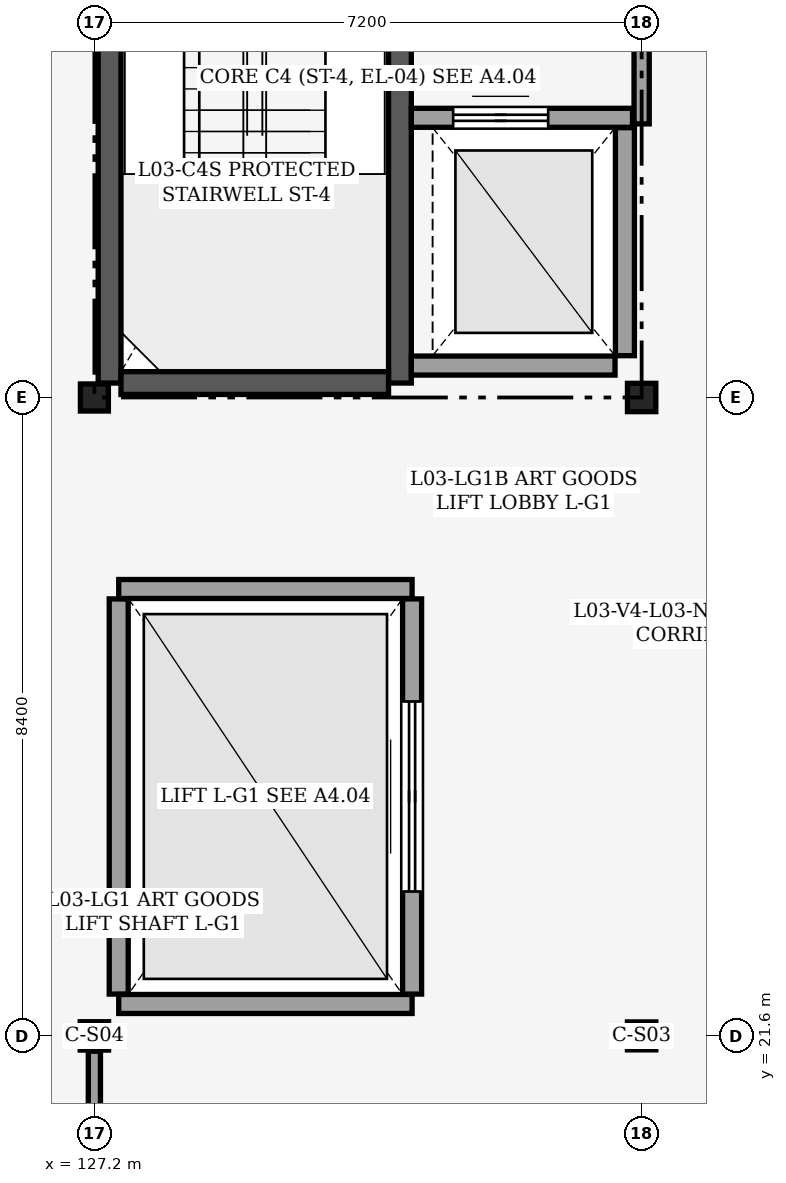
"""IFC4 building model, lengths in metres.
Left out: names, types, materials, properties, quantities, classifications, styles, units other than length and angle.
Written with IfcOpenShell. Run it as: python <this file> out.ifc"""

import sys

from ifc_helpers import new_model, si_unit, direction, frame, frame_2d, origin, origin_2d, place, context, subcontext, project, spatial, rectangle, i_section, extrude, element, fill, save


model = new_model("IFC4")
c1 = context("Model", 3, precision=1e-05, world=origin(), true_north=direction((0.0, 1.0)))
c2 = subcontext(c1, "Body", "Model", "MODEL_VIEW")
j1 = project(units=[si_unit("LENGTHUNIT", "METRE"), si_unit("PLANEANGLEUNIT", "RADIAN")], contexts=[c1])
p1 = place(None, origin())
s1 = spatial("IfcSite", under=j1, at=p1, CompositionType="ELEMENT")
p2 = place(p1, origin())
s2 = spatial("IfcBuilding", under=s1, at=p2, CompositionType="ELEMENT")
p3 = place(p2, frame((0.0, 0.0, 15.0)))
s3 = spatial("IfcBuildingStorey", under=s2, at=p3, CompositionType="ELEMENT", Elevation=15.0)
p4 = place(p3, frame((127.2, 21.6, 0.0), z_axis=(0.0, 0.0, 1.0), x_axis=(1.0, 0.0, 0.0)))
e1 = element("IfcColumn", 1, at=p4, inside=s3, PredefinedType="COLUMN", context=c2, shape_type="SweptSolid", body=[
    extrude(i_section(OverallWidth=0.373, OverallDepth=0.373, WebThickness=0.016, FlangeThickness=0.026, FilletRadius=0.025, at=origin_2d()), origin(), (0.0, 0.0, 1.0), 4.8),
])
p5 = place(p3, frame((127.2, 30.0, 0.0), z_axis=(0.0, 0.0, 1.0), x_axis=(1.0, 0.0, 0.0)))
e2 = element("IfcColumn", 2, at=p5, inside=s3, PredefinedType="COLUMN", context=c2, shape_type="SweptSolid", body=[
    extrude(i_section(OverallWidth=0.368, OverallDepth=0.356, WebThickness=0.011, FlangeThickness=0.018, FilletRadius=0.025, at=origin_2d()), origin(), (0.0, 0.0, 1.0), 4.8),
])
p6 = place(p3, frame((134.4, 21.6, 0.0), z_axis=(0.0, 0.0, 1.0), x_axis=(1.0, 0.0, 0.0)))
e3 = element("IfcColumn", 3, at=p6, inside=s3, PredefinedType="COLUMN", context=c2, shape_type="SweptSolid", body=[
    extrude(i_section(OverallWidth=0.373, OverallDepth=0.368, WebThickness=0.015, FlangeThickness=0.024, FilletRadius=0.025, at=origin_2d()), origin(), (0.0, 0.0, 1.0), 4.8),
])
p7 = place(p3, frame((134.4, 30.0, 0.0), z_axis=(0.0, 0.0, 1.0), x_axis=(1.0, 0.0, 0.0)))
e4 = element("IfcColumn", 4, at=p7, inside=s3, PredefinedType="COLUMN", context=c2, shape_type="SweptSolid", body=[
    extrude(i_section(OverallWidth=0.373, OverallDepth=0.373, WebThickness=0.016, FlangeThickness=0.026, FilletRadius=0.025, at=origin_2d()), origin(), (0.0, 0.0, 1.0), 4.8),
])
p8 = place(p3, frame((127.4, 30.19, 0.0), z_axis=(0.0, 0.0, 1.0), x_axis=(0.0, 1.0, 0.0)))
e5 = element("IfcWall", 5, at=p8, inside=s3, PredefinedType="SHEAR", context=c2, shape_type="SweptSolid", body=[
    extrude(rectangle(XDim=8.02, YDim=0.3, at=frame_2d((4.01, 0.0))), origin(), (0.0, 0.0, 1.0), 4.54),
])
p9 = place(p3, frame((131.22, 30.19, 0.0), z_axis=(0.0, 0.0, 1.0), x_axis=(0.0, 1.0, 0.0)))
e6 = element("IfcWall", 6, at=p9, inside=s3, PredefinedType="SHEAR", context=c2, shape_type="SweptSolid", body=[
    extrude(rectangle(XDim=8.02, YDim=0.3, at=frame_2d((4.01, 0.0))), origin(), (0.0, 0.0, 1.0), 4.54),
])
p10 = place(p9, frame((6.47, 0.0, 0.0)))
e7 = element("IfcOpeningElement", 7, at=p10, cuts=e6, PredefinedType="OPENING", context=c2, shape_type="SweptSolid", body=[
    extrude(rectangle(XDim=1.1, YDim=2.15, at=frame_2d((0.55, 1.075))), frame((0.0, 0.16, 0.0), z_axis=(0.0, -1.0, 0.0), x_axis=(1.0, 0.0, 0.0)), (0.0, 0.0, 1.0), 0.321),
])
p11 = place(p3, frame((127.55, 30.19, 0.0), z_axis=(0.0, 0.0, 1.0), x_axis=(1.0, 0.0, 0.0)))
e8 = element("IfcWall", 8, at=p11, inside=s3, PredefinedType="SHEAR", context=c2, shape_type="SweptSolid", body=[
    extrude(rectangle(XDim=3.52, YDim=0.3, at=frame_2d((1.76, 0.0))), origin(), (0.0, 0.0, 1.0), 4.54),
])
p12 = place(p3, frame((131.37, 30.42, 0.0), z_axis=(0.0, 0.0, 1.0), x_axis=(1.0, 0.0, 0.0)))
e9 = element("IfcWall", 9, at=p12, inside=s3, PredefinedType="PARTITIONING", context=c2, shape_type="SweptSolid", body=[
    extrude(rectangle(XDim=2.68, YDim=0.25, at=frame_2d((1.34, 0.0))), origin(), (0.0, 0.0, 1.0), 4.54),
])
p13 = place(p3, frame((134.18, 30.55, 0.0), z_axis=(0.0, 0.0, 1.0), x_axis=(0.0, 1.0, 0.0)))
e10 = element("IfcWall", 10, at=p13, inside=s3, PredefinedType="PARTITIONING", context=c2, shape_type="SweptSolid", body=[
    extrude(rectangle(XDim=3.0, YDim=0.25, at=frame_2d((1.5, 0.0))), origin(), (0.0, 0.0, 1.0), 3.593),
])
p14 = place(p3, frame((131.37, 33.68, 0.0), z_axis=(0.0, 0.0, 1.0), x_axis=(1.0, 0.0, 0.0)))
e11 = element("IfcWall", 11, at=p14, inside=s3, PredefinedType="PARTITIONING", context=c2, shape_type="SweptSolid", body=[
    extrude(rectangle(XDim=2.91, YDim=0.25, at=frame_2d((1.455, 0.0))), origin(), (0.0, 0.0, 1.0), 4.54),
])
p15 = place(p14, frame((0.55, 0.0, 0.0)))
e12 = element("IfcOpeningElement", 12, at=p15, cuts=e11, PredefinedType="OPENING", context=c2, shape_type="SweptSolid", body=[
    extrude(rectangle(XDim=1.25, YDim=2.15, at=frame_2d((0.625, 1.075))), frame((0.0, 0.135, 0.0), z_axis=(0.0, -1.0, 0.0), x_axis=(1.0, 0.0, 0.0)), (0.0, 0.0, 1.0), 0.271),
])
p16 = place(p3, frame((134.4, 33.6, 0.0), z_axis=(0.0, 0.0, 1.0), x_axis=(0.0, 1.0, 0.0)))
e13 = element("IfcWall", 13, at=p16, inside=s3, PredefinedType="PARTITIONING", context=c2, shape_type="SweptSolid", body=[
    extrude(rectangle(XDim=4.58, YDim=0.2, at=frame_2d((2.29, 0.0))), origin(), (0.0, 0.0, 1.0), 3.593),
])
p17 = place(p3, frame((127.52, 22.15, 0.0), z_axis=(0.0, 0.0, 1.0), x_axis=(0.0, 1.0, 0.0)))
e14 = element("IfcWall", 14, at=p17, inside=s3, PredefinedType="PARTITIONING", context=c2, shape_type="SweptSolid", body=[
    extrude(rectangle(XDim=5.2, YDim=0.25, at=frame_2d((2.6, 0.0))), origin(), (0.0, 0.0, 1.0), 3.748),
])
for number, where, z_axis, x_axis in (
    (15, (127.52, 27.48, 0.0), (0.0, 0.0, 1.0), (1.0, 0.0, 0.0)),
    (16, (127.52, 22.02, 0.0), (0.0, 0.0, 1.0), (1.0, 0.0, 0.0)),
):
    element("IfcWall", number, at=place(p3, frame(where, z_axis=z_axis, x_axis=x_axis)), inside=s3, PredefinedType="PARTITIONING", context=c2, shape_type="SweptSolid", body=[
        extrude(rectangle(XDim=3.86, YDim=0.25, at=frame_2d((1.93, 0.0))), origin(), (0.0, 0.0, 1.0), 4.54),
    ])
p18 = place(p3, frame((131.38, 22.15, 0.0), z_axis=(0.0, 0.0, 1.0), x_axis=(0.0, 1.0, 0.0)))
e17 = element("IfcWall", 17, at=p18, inside=s3, PredefinedType="PARTITIONING", context=c2, shape_type="SweptSolid", body=[
    extrude(rectangle(XDim=5.2, YDim=0.25, at=frame_2d((2.6, 0.0))), origin(), (0.0, 0.0, 1.0), 4.54),
])
p19 = place(p18, frame((1.35, 0.0, 0.0)))
e18 = element("IfcOpeningElement", 18, at=p19, cuts=e17, PredefinedType="OPENING", context=c2, shape_type="SweptSolid", body=[
    extrude(rectangle(XDim=2.5, YDim=2.6, at=frame_2d((1.25, 1.3))), frame((0.0, 0.135, 0.0), z_axis=(0.0, -1.0, 0.0), x_axis=(1.0, 0.0, 0.0)), (0.0, 0.0, 1.0), 0.271),
])
p20 = place(p3, frame((127.2, 14.567, 0.0), z_axis=(0.0, 0.0, 1.0), x_axis=(0.0, 1.0, 0.0)))
e19 = element("IfcWall", 19, at=p20, inside=s3, PredefinedType="PARTITIONING", context=c2, shape_type="SweptSolid", body=[
    extrude(rectangle(XDim=6.831, YDim=0.16, at=frame_2d((3.416, 0.0))), origin(), (0.0, 0.0, 1.0), 4.058),
])
p21 = place(p15, origin())
e20 = element("IfcDoor", 20, at=p21, inside=s3, OperationType="DOUBLE_DOOR_SLIDING", PredefinedType="DOOR", context=c2, shape_type="SweptSolid", body=[
    extrude(rectangle(XDim=1.25, YDim=2.15, at=frame_2d((0.625, 1.075))), frame((0.0, 0.025, 0.0), z_axis=(0.0, -1.0, 0.0), x_axis=(1.0, 0.0, 0.0)), (0.0, 0.0, 1.0), 0.05),
])
fill(e12, e20)
p22 = place(p19, origin())
e21 = element("IfcDoor", 21, at=p22, inside=s3, OperationType="DOUBLE_DOOR_SLIDING", PredefinedType="DOOR", context=c2, shape_type="SweptSolid", body=[
    extrude(rectangle(XDim=2.5, YDim=2.6, at=frame_2d((1.25, 1.3))), frame((0.0, 0.025, 0.0), z_axis=(0.0, -1.0, 0.0), x_axis=(1.0, 0.0, 0.0)), (0.0, 0.0, 1.0), 0.05),
])
fill(e18, e21)
save(model, sys.argv[1])
